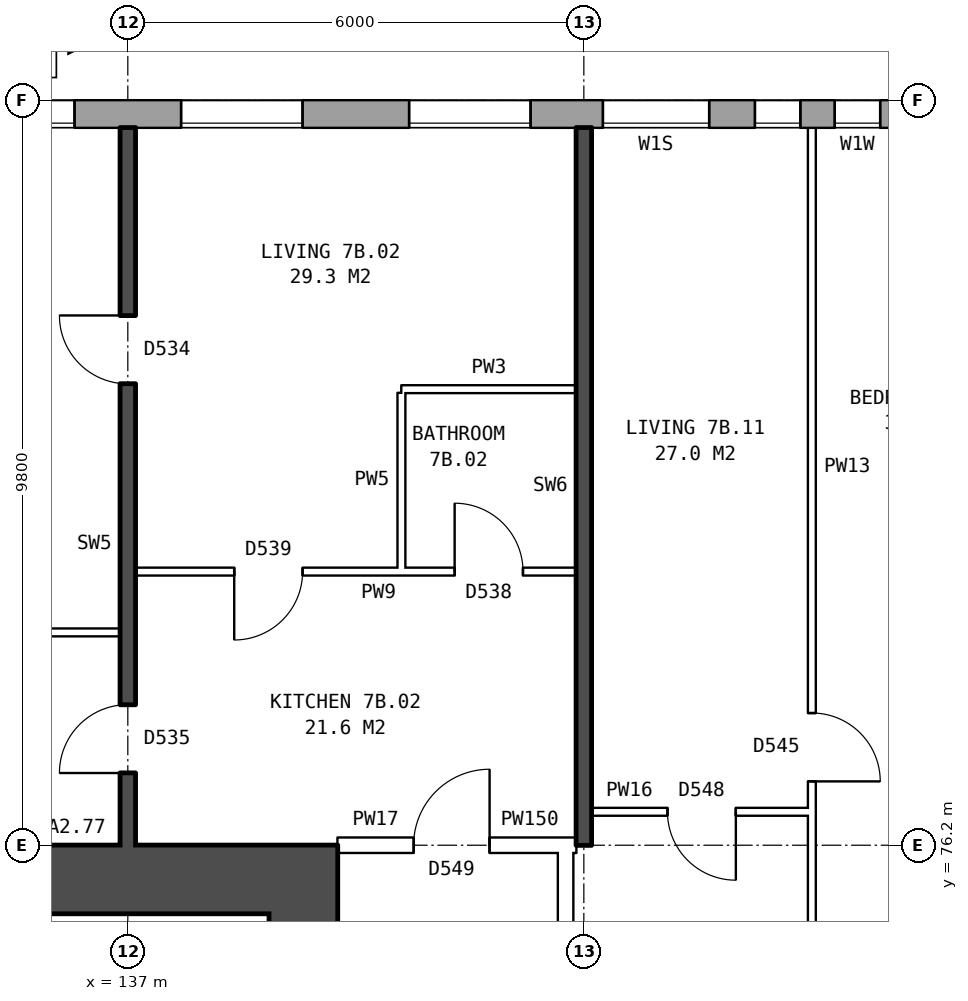
"""IFC4 building model, lengths in metres.
Left out: names, types, materials, properties, quantities, classifications, styles, units other than length and angle.
Written with IfcOpenShell. Run it as: python <this file> out.ifc"""

import sys

from ifc_helpers import new_model, si_unit, direction, frame, frame_2d, origin, place, context, subcontext, project, spatial, rectangle, extrude, element, fill, save


model = new_model("IFC4")
c1 = context("Model", 3, precision=1e-05, world=origin(), true_north=direction((0.0, 1.0)))
c2 = subcontext(c1, "Body", "Model", "MODEL_VIEW")
j1 = project(units=[si_unit("LENGTHUNIT", "METRE"), si_unit("PLANEANGLEUNIT", "RADIAN")], contexts=[c1])
p1 = place(None, origin())
s1 = spatial("IfcSite", under=j1, at=p1, CompositionType="ELEMENT")
p2 = place(p1, origin())
s2 = spatial("IfcBuilding", under=s1, at=p2, CompositionType="ELEMENT")
p3 = place(p2, frame((0.0, 0.0, 28.8)))
s3 = spatial("IfcBuildingStorey", under=s2, at=p3, CompositionType="ELEMENT", Elevation=28.8)
p4 = place(p3, frame((174.675, 85.82, 0.0), z_axis=(0.0, 0.0, 1.0), x_axis=(-1.0, 0.0, 0.0)))
e1 = element("IfcWall", 1, at=p4, inside=s3, PredefinedType="STANDARD", context=c2, shape_type="SweptSolid", body=[
    extrude(rectangle(XDim=40.601, YDim=0.36, at=frame_2d((20.3, 0.0))), origin(), (0.0, 0.0, 1.0), 2.85),
])
p5 = place(p4, frame((2.375, 0.0, 0.8)))
e2 = element("IfcOpeningElement", 2, at=p5, cuts=e1, PredefinedType="OPENING", context=c2, shape_type="SweptSolid", body=[
    extrude(rectangle(XDim=1.6, YDim=1.8, at=frame_2d((0.8, 0.9))), frame((0.0, 0.19, 0.0), z_axis=(0.0, -1.0, 0.0), x_axis=(1.0, 0.0, 0.0)), (0.0, 0.0, 1.0), 0.38),
])
p6 = place(p4, frame((5.375, 0.0, 0.8)))
e3 = element("IfcOpeningElement", 3, at=p6, cuts=e1, PredefinedType="OPENING", context=c2, shape_type="SweptSolid", body=[
    extrude(rectangle(XDim=1.6, YDim=1.8, at=frame_2d((0.8, 0.9))), frame((0.0, 0.19, 0.0), z_axis=(0.0, -1.0, 0.0), x_axis=(1.0, 0.0, 0.0)), (0.0, 0.0, 1.0), 0.38),
])
p7 = place(p4, frame((7.875, 0.0, 0.8)))
e4 = element("IfcOpeningElement", 4, at=p7, cuts=e1, PredefinedType="OPENING", context=c2, shape_type="SweptSolid", body=[
    extrude(rectangle(XDim=1.6, YDim=1.8, at=frame_2d((0.8, 0.9))), frame((0.0, 0.19, 0.0), z_axis=(0.0, -1.0, 0.0), x_axis=(1.0, 0.0, 0.0)), (0.0, 0.0, 1.0), 0.38),
])
p8 = place(p4, frame((9.775, 0.0, 1.7)))
e5 = element("IfcOpeningElement", 5, at=p8, cuts=e1, PredefinedType="OPENING", context=c2, shape_type="SweptSolid", body=[
    extrude(rectangle(XDim=0.8, YDim=0.9, at=frame_2d((0.4, 0.45))), frame((0.0, 0.19, 0.0), z_axis=(0.0, -1.0, 0.0), x_axis=(1.0, 0.0, 0.0)), (0.0, 0.0, 1.0), 0.38),
])
p9 = place(p4, frame((14.375, 0.0, 0.8)))
e6 = element("IfcOpeningElement", 6, at=p9, cuts=e1, PredefinedType="OPENING", context=c2, shape_type="SweptSolid", body=[
    extrude(rectangle(XDim=1.6, YDim=1.8, at=frame_2d((0.8, 0.9))), frame((0.0, 0.19, 0.0), z_axis=(0.0, -1.0, 0.0), x_axis=(1.0, 0.0, 0.0)), (0.0, 0.0, 1.0), 0.38),
])
p10 = place(p4, frame((17.375, 0.0, 0.8)))
e7 = element("IfcOpeningElement", 7, at=p10, cuts=e1, PredefinedType="OPENING", context=c2, shape_type="SweptSolid", body=[
    extrude(rectangle(XDim=1.6, YDim=1.8, at=frame_2d((0.8, 0.9))), frame((0.0, 0.19, 0.0), z_axis=(0.0, -1.0, 0.0), x_axis=(1.0, 0.0, 0.0)), (0.0, 0.0, 1.0), 0.38),
])
p11 = place(p4, frame((20.375, 0.0, 0.8)))
e8 = element("IfcOpeningElement", 8, at=p11, cuts=e1, PredefinedType="OPENING", context=c2, shape_type="SweptSolid", body=[
    extrude(rectangle(XDim=1.6, YDim=1.8, at=frame_2d((0.8, 0.9))), frame((0.0, 0.19, 0.0), z_axis=(0.0, -1.0, 0.0), x_axis=(1.0, 0.0, 0.0)), (0.0, 0.0, 1.0), 0.38),
])
p12 = place(p4, frame((23.375, 0.0, 0.8)))
e9 = element("IfcOpeningElement", 9, at=p12, cuts=e1, PredefinedType="OPENING", context=c2, shape_type="SweptSolid", body=[
    extrude(rectangle(XDim=1.6, YDim=1.8, at=frame_2d((0.8, 0.9))), frame((0.0, 0.19, 0.0), z_axis=(0.0, -1.0, 0.0), x_axis=(1.0, 0.0, 0.0)), (0.0, 0.0, 1.0), 0.38),
])
p13 = place(p4, frame((25.875, 0.0, 0.8)))
e10 = element("IfcOpeningElement", 10, at=p13, cuts=e1, PredefinedType="OPENING", context=c2, shape_type="SweptSolid", body=[
    extrude(rectangle(XDim=1.6, YDim=1.8, at=frame_2d((0.8, 0.9))), frame((0.0, 0.19, 0.0), z_axis=(0.0, -1.0, 0.0), x_axis=(1.0, 0.0, 0.0)), (0.0, 0.0, 1.0), 0.38),
])
p14 = place(p4, frame((28.825, 0.0, 0.15)))
e11 = element("IfcOpeningElement", 11, at=p14, cuts=e1, PredefinedType="OPENING", context=c2, shape_type="SweptSolid", body=[
    extrude(rectangle(XDim=0.6, YDim=0.9, at=frame_2d((0.3, 0.45))), frame((0.0, 0.19, 0.0), z_axis=(0.0, -1.0, 0.0), x_axis=(1.0, 0.0, 0.0)), (0.0, 0.0, 1.0), 0.38),
])
p15 = place(p4, frame((32.375, 0.0, 0.8)))
e12 = element("IfcOpeningElement", 12, at=p15, cuts=e1, PredefinedType="OPENING", context=c2, shape_type="SweptSolid", body=[
    extrude(rectangle(XDim=1.6, YDim=1.8, at=frame_2d((0.8, 0.9))), frame((0.0, 0.19, 0.0), z_axis=(0.0, -1.0, 0.0), x_axis=(1.0, 0.0, 0.0)), (0.0, 0.0, 1.0), 0.38),
])
p16 = place(p4, frame((35.375, 0.0, 0.8)))
e13 = element("IfcOpeningElement", 13, at=p16, cuts=e1, PredefinedType="OPENING", context=c2, shape_type="SweptSolid", body=[
    extrude(rectangle(XDim=1.6, YDim=1.8, at=frame_2d((0.8, 0.9))), frame((0.0, 0.19, 0.0), z_axis=(0.0, -1.0, 0.0), x_axis=(1.0, 0.0, 0.0)), (0.0, 0.0, 1.0), 0.38),
])
p17 = place(p4, frame((38.375, 0.0, 0.8)))
e14 = element("IfcOpeningElement", 14, at=p17, cuts=e1, PredefinedType="OPENING", context=c2, shape_type="SweptSolid", body=[
    extrude(rectangle(XDim=1.6, YDim=1.8, at=frame_2d((0.8, 0.9))), frame((0.0, 0.19, 0.0), z_axis=(0.0, -1.0, 0.0), x_axis=(1.0, 0.0, 0.0)), (0.0, 0.0, 1.0), 0.38),
])
p18 = place(p4, frame((12.275, 0.0, 0.8)))
e15 = element("IfcOpeningElement", 15, at=p18, cuts=e1, PredefinedType="OPENING", context=c2, shape_type="SweptSolid", body=[
    extrude(rectangle(XDim=1.2, YDim=1.2, at=frame_2d((0.6, 0.6))), frame((0.0, 0.19, 0.0), z_axis=(0.0, -1.0, 0.0), x_axis=(1.0, 0.0, 0.0)), (0.0, 0.0, 1.0), 0.38),
])
p19 = place(p4, frame((27.775, 0.0, 0.8)))
e16 = element("IfcOpeningElement", 16, at=p19, cuts=e1, PredefinedType="OPENING", context=c2, shape_type="SweptSolid", body=[
    extrude(rectangle(XDim=0.6, YDim=0.9, at=frame_2d((0.3, 0.45))), frame((0.0, 0.19, 0.0), z_axis=(0.0, -1.0, 0.0), x_axis=(1.0, 0.0, 0.0)), (0.0, 0.0, 1.0), 0.38),
])
p20 = place(p4, frame((30.025, 0.0, 1.65)))
e17 = element("IfcOpeningElement", 17, at=p20, cuts=e1, PredefinedType="OPENING", context=c2, shape_type="SweptSolid", body=[
    extrude(rectangle(XDim=1.4, YDim=0.9, at=frame_2d((0.7, 0.45))), frame((0.0, 0.19, 0.0), z_axis=(0.0, -1.0, 0.0), x_axis=(1.0, 0.0, 0.0)), (0.0, 0.0, 1.0), 0.38),
])
p21 = place(p3, frame((139.31, 64.7, 0.0), z_axis=(0.0, 0.0, 1.0), x_axis=(0.0, 1.0, 0.0)))
e18 = element("IfcWall", 18, at=p21, inside=s3, PredefinedType="SHEAR", context=c2, shape_type="SweptSolid", body=[
    extrude(rectangle(XDim=10.6, YDim=0.9, at=frame_2d((5.3, 0.0))), origin(), (0.0, 0.0, 1.0), 2.85),
])
p22 = place(p21, frame((0.425, 0.0, 0.0)))
e19 = element("IfcOpeningElement", 19, at=p22, cuts=e18, PredefinedType="OPENING", context=c2, shape_type="SweptSolid", body=[
    extrude(rectangle(XDim=1.1, YDim=2.1, at=frame_2d((0.55, 1.05))), frame((0.0, 0.46, 0.0), z_axis=(0.0, -1.0, 0.0), x_axis=(1.0, 0.0, 0.0)), (0.0, 0.0, 1.0), 0.92),
])
p23 = place(p21, frame((9.0, 0.0, 0.0)))
e20 = element("IfcOpeningElement", 20, at=p23, cuts=e18, PredefinedType="OPENING", context=c2, shape_type="SweptSolid", body=[
    extrude(rectangle(XDim=1.1, YDim=2.1, at=frame_2d((0.55, 1.05))), frame((0.0, 0.46, 0.0), z_axis=(0.0, -1.0, 0.0), x_axis=(1.0, 0.0, 0.0)), (0.0, 0.0, 1.0), 0.92),
])
p24 = place(p21, frame((7.225, 0.0, 0.0)))
e21 = element("IfcOpeningElement", 21, at=p24, cuts=e18, PredefinedType="OPENING", context=c2, shape_type="SweptSolid", body=[
    extrude(rectangle(XDim=0.85, YDim=2.1, at=frame_2d((0.425, 1.05))), frame((0.0, 0.46, 0.0), z_axis=(0.0, -1.0, 0.0), x_axis=(1.0, 0.0, 0.0)), (0.0, 0.0, 1.0), 0.92),
])
p25 = place(p3, frame((139.76, 75.75, 0.0), z_axis=(0.0, 0.0, 1.0), x_axis=(-1.0, 0.0, 0.0)))
e22 = element("IfcWall", 22, at=p25, inside=s3, PredefinedType="SHEAR", context=c2, shape_type="SweptSolid", body=[
    extrude(rectangle(XDim=8.4, YDim=0.9, at=frame_2d((4.2, 0.0))), origin(), (0.0, 0.0, 1.0), 2.85),
])
p26 = place(p3, frame((142.76, 63.9, 0.0), z_axis=(0.0, 0.0, 1.0), x_axis=(0.0, 1.0, 0.0)))
e23 = element("IfcWall", 23, at=p26, inside=s3, PredefinedType="PARTITIONING", context=c2, shape_type="SweptSolid", body=[
    extrude(rectangle(XDim=12.2, YDim=0.2, at=frame_2d((6.1, 0.0))), origin(), (0.0, 0.0, 1.0), 2.85),
])
p27 = place(p26, frame((5.1, 0.0, 0.0)))
e24 = element("IfcOpeningElement", 24, at=p27, cuts=e23, PredefinedType="OPENING", context=c2, shape_type="SweptSolid", body=[
    extrude(rectangle(XDim=2.0, YDim=2.1, at=frame_2d((1.0, 1.05))), frame((0.0, 0.11, 0.0), z_axis=(0.0, -1.0, 0.0), x_axis=(1.0, 0.0, 0.0)), (0.0, 0.0, 1.0), 0.22),
])
p28 = place(p3, frame((139.76, 76.2, 0.0), z_axis=(0.0, 0.0, 1.0), x_axis=(1.0, 0.0, 0.0)))
e25 = element("IfcWall", 25, at=p28, inside=s3, PredefinedType="PARTITIONING", context=c2, shape_type="SweptSolid", body=[
    extrude(rectangle(XDim=3.0, YDim=0.2, at=frame_2d((1.5, 0.0))), origin(), (0.0, 0.0, 1.0), 2.85),
])
p29 = place(p28, frame((1.0, 0.0, 0.0)))
e26 = element("IfcOpeningElement", 26, at=p29, cuts=e25, PredefinedType="OPENING", context=c2, shape_type="SweptSolid", body=[
    extrude(rectangle(XDim=1.0, YDim=2.1, at=frame_2d((0.5, 1.05))), frame((0.0, 0.11, 0.0), z_axis=(0.0, -1.0, 0.0), x_axis=(1.0, 0.0, 0.0)), (0.0, 0.0, 1.0), 0.22),
])
p30 = place(p3, frame((142.76, 76.2, 0.0), z_axis=(0.0, 0.0, 1.0), x_axis=(1.0, 0.0, 0.0)))
e27 = element("IfcWall", 27, at=p30, inside=s3, PredefinedType="PARTITIONING", context=c2, shape_type="SweptSolid", body=[
    extrude(rectangle(XDim=0.14, YDim=0.2, at=frame_2d((0.07, 0.0))), origin(), (0.0, 0.0, 1.0), 2.85),
])
p31 = place(p3, frame((143.1, 76.64, 0.0), z_axis=(0.0, 0.0, 1.0), x_axis=(1.0, 0.0, 0.0)))
e28 = element("IfcWall", 28, at=p31, inside=s3, PredefinedType="PARTITIONING", context=c2, shape_type="SweptSolid", body=[
    extrude(rectangle(XDim=2.9, YDim=0.1, at=frame_2d((1.45, 0.0))), origin(), (0.0, 0.0, 1.0), 2.85),
])
p32 = place(p31, frame((1.0, 0.0, 0.0)))
e29 = element("IfcOpeningElement", 29, at=p32, cuts=e28, PredefinedType="OPENING", context=c2, shape_type="SweptSolid", body=[
    extrude(rectangle(XDim=0.9, YDim=2.1, at=frame_2d((0.45, 1.05))), frame((0.0, 0.06, 0.0), z_axis=(0.0, -1.0, 0.0), x_axis=(1.0, 0.0, 0.0)), (0.0, 0.0, 1.0), 0.12),
])
p33 = place(p3, frame((131.36, 79.0, 0.0), z_axis=(0.0, 0.0, 1.0), x_axis=(1.0, 0.0, 0.0)))
e30 = element("IfcWall", 30, at=p33, inside=s3, PredefinedType="PARTITIONING", context=c2, shape_type="SweptSolid", body=[
    extrude(rectangle(XDim=5.54, YDim=0.1, at=frame_2d((2.77, 0.0))), origin(), (0.0, 0.0, 1.0), 2.85),
])
p34 = place(p3, frame((137.1, 79.8, 0.0), z_axis=(0.0, 0.0, 1.0), x_axis=(1.0, 0.0, 0.0)))
e31 = element("IfcWall", 31, at=p34, inside=s3, PredefinedType="PARTITIONING", context=c2, shape_type="SweptSolid", body=[
    extrude(rectangle(XDim=5.8, YDim=0.1, at=frame_2d((2.9, 0.0))), origin(), (0.0, 0.0, 1.0), 2.85),
])
p35 = place(p34, frame((1.3, 0.0, 0.0)))
e32 = element("IfcOpeningElement", 32, at=p35, cuts=e31, PredefinedType="OPENING", context=c2, shape_type="SweptSolid", body=[
    extrude(rectangle(XDim=0.9, YDim=2.1, at=frame_2d((0.45, 1.05))), frame((0.0, 0.06, 0.0), z_axis=(0.0, -1.0, 0.0), x_axis=(1.0, 0.0, 0.0)), (0.0, 0.0, 1.0), 0.12),
])
p36 = place(p34, frame((4.2, 0.0, 0.0)))
e33 = element("IfcOpeningElement", 33, at=p36, cuts=e31, PredefinedType="OPENING", context=c2, shape_type="SweptSolid", body=[
    extrude(rectangle(XDim=0.9, YDim=2.1, at=frame_2d((0.45, 1.05))), frame((0.0, 0.06, 0.0), z_axis=(0.0, -1.0, 0.0), x_axis=(1.0, 0.0, 0.0)), (0.0, 0.0, 1.0), 0.12),
])
p37 = place(p3, frame((140.6, 82.2, 0.0), z_axis=(0.0, 0.0, 1.0), x_axis=(1.0, 0.0, 0.0)))
e34 = element("IfcWall", 34, at=p37, inside=s3, PredefinedType="PARTITIONING", context=c2, shape_type="SweptSolid", body=[
    extrude(rectangle(XDim=2.3, YDim=0.1, at=frame_2d((1.15, 0.0))), origin(), (0.0, 0.0, 1.0), 2.85),
])
p38 = place(p3, frame((137.0, 76.2, 0.0), z_axis=(0.0, 0.0, 1.0), x_axis=(0.0, 1.0, 0.0)))
e35 = element("IfcWall", 35, at=p38, inside=s3, PredefinedType="SOLIDWALL", context=c2, shape_type="SweptSolid", body=[
    extrude(rectangle(XDim=9.44, YDim=0.2, at=frame_2d((4.72, 0.0))), origin(), (0.0, 0.0, 1.0), 2.85),
])
p39 = place(p38, frame((6.07, 0.0, 0.0)))
e36 = element("IfcOpeningElement", 36, at=p39, cuts=e35, PredefinedType="OPENING", context=c2, shape_type="SweptSolid", body=[
    extrude(rectangle(XDim=0.9, YDim=2.1, at=frame_2d((0.45, 1.05))), frame((0.0, 0.11, 0.0), z_axis=(0.0, -1.0, 0.0), x_axis=(1.0, 0.0, 0.0)), (0.0, 0.0, 1.0), 0.22),
])
p40 = place(p38, frame((0.95, 0.0, 0.0)))
e37 = element("IfcOpeningElement", 37, at=p40, cuts=e35, PredefinedType="OPENING", context=c2, shape_type="SweptSolid", body=[
    extrude(rectangle(XDim=0.9, YDim=2.1, at=frame_2d((0.45, 1.05))), frame((0.0, 0.11, 0.0), z_axis=(0.0, -1.0, 0.0), x_axis=(1.0, 0.0, 0.0)), (0.0, 0.0, 1.0), 0.22),
])
p41 = place(p3, frame((140.6, 79.85, 0.0), z_axis=(0.0, 0.0, 1.0), x_axis=(0.0, 1.0, 0.0)))
e38 = element("IfcWall", 38, at=p41, inside=s3, PredefinedType="PARTITIONING", context=c2, shape_type="SweptSolid", body=[
    extrude(rectangle(XDim=2.3, YDim=0.1, at=frame_2d((1.15, 0.0))), origin(), (0.0, 0.0, 1.0), 2.85),
])
p42 = place(p3, frame((143.0, 76.2, 0.0), z_axis=(0.0, 0.0, 1.0), x_axis=(0.0, 1.0, 0.0)))
e39 = element("IfcWall", 39, at=p42, inside=s3, PredefinedType="SOLIDWALL", context=c2, shape_type="SweptSolid", body=[
    extrude(rectangle(XDim=9.44, YDim=0.2, at=frame_2d((4.72, 0.0))), origin(), (0.0, 0.0, 1.0), 2.85),
])
p43 = place(p3, frame((146.0, 71.3, 0.0), z_axis=(0.0, 0.0, 1.0), x_axis=(0.0, 1.0, 0.0)))
e40 = element("IfcWall", 40, at=p43, inside=s3, PredefinedType="PARTITIONING", context=c2, shape_type="SweptSolid", body=[
    extrude(rectangle(XDim=14.34, YDim=0.1, at=frame_2d((7.17, 0.0))), origin(), (0.0, 0.0, 1.0), 2.85),
])
p44 = place(p43, frame((5.74, 0.0, 0.0)))
e41 = element("IfcOpeningElement", 41, at=p44, cuts=e40, PredefinedType="OPENING", context=c2, shape_type="SweptSolid", body=[
    extrude(rectangle(XDim=0.9, YDim=2.1, at=frame_2d((0.45, 1.05))), frame((0.0, 0.06, 0.0), z_axis=(0.0, -1.0, 0.0), x_axis=(1.0, 0.0, 0.0)), (0.0, 0.0, 1.0), 0.12),
])
p45 = place(p43, frame((0.4, 0.0, 0.0)))
e42 = element("IfcOpeningElement", 42, at=p45, cuts=e40, PredefinedType="OPENING", context=c2, shape_type="SweptSolid", body=[
    extrude(rectangle(XDim=0.9, YDim=2.1, at=frame_2d((0.45, 1.05))), frame((0.0, 0.06, 0.0), z_axis=(0.0, -1.0, 0.0), x_axis=(1.0, 0.0, 0.0)), (0.0, 0.0, 1.0), 0.12),
])
p46 = place(p14, origin())
e43 = element("IfcWindow", 43, at=p46, inside=s3, PartitioningType="SINGLE_PANEL", PredefinedType="WINDOW", context=c2, shape_type="SweptSolid", body=[
    extrude(rectangle(XDim=0.6, YDim=0.9, at=frame_2d((0.3, 0.45))), frame((0.0, 0.15, 0.0), z_axis=(0.0, -1.0, 0.0), x_axis=(1.0, 0.0, 0.0)), (0.0, 0.0, 1.0), 0.06),
])
fill(e11, e43)
p47 = place(p15, origin())
e44 = element("IfcWindow", 44, at=p47, inside=s3, PartitioningType="SINGLE_PANEL", PredefinedType="WINDOW", context=c2, shape_type="SweptSolid", body=[
    extrude(rectangle(XDim=1.6, YDim=1.8, at=frame_2d((0.8, 0.9))), frame((0.0, 0.15, 0.0), z_axis=(0.0, -1.0, 0.0), x_axis=(1.0, 0.0, 0.0)), (0.0, 0.0, 1.0), 0.06),
])
fill(e12, e44)
p48 = place(p16, origin())
e45 = element("IfcWindow", 45, at=p48, inside=s3, PartitioningType="SINGLE_PANEL", PredefinedType="WINDOW", context=c2, shape_type="SweptSolid", body=[
    extrude(rectangle(XDim=1.6, YDim=1.8, at=frame_2d((0.8, 0.9))), frame((0.0, 0.15, 0.0), z_axis=(0.0, -1.0, 0.0), x_axis=(1.0, 0.0, 0.0)), (0.0, 0.0, 1.0), 0.06),
])
fill(e13, e45)
p49 = place(p17, origin())
e46 = element("IfcWindow", 46, at=p49, inside=s3, PartitioningType="SINGLE_PANEL", PredefinedType="WINDOW", context=c2, shape_type="SweptSolid", body=[
    extrude(rectangle(XDim=1.6, YDim=1.8, at=frame_2d((0.8, 0.9))), frame((0.0, 0.15, 0.0), z_axis=(0.0, -1.0, 0.0), x_axis=(1.0, 0.0, 0.0)), (0.0, 0.0, 1.0), 0.06),
])
fill(e14, e46)
p50 = place(p39, origin())
e47 = element("IfcDoor", 47, at=p50, inside=s3, OperationType="SINGLE_SWING_RIGHT", PredefinedType="DOOR", context=c2, shape_type="SweptSolid", body=[
    extrude(rectangle(XDim=0.9, YDim=2.1, at=frame_2d((0.45, 1.05))), frame((0.0, 0.025, 0.0), z_axis=(0.0, -1.0, 0.0), x_axis=(1.0, 0.0, 0.0)), (0.0, 0.0, 1.0), 0.05),
])
fill(e36, e47)
p51 = place(p40, origin())
e48 = element("IfcDoor", 48, at=p51, inside=s3, OperationType="SINGLE_SWING_LEFT", PredefinedType="DOOR", context=c2, shape_type="SweptSolid", body=[
    extrude(rectangle(XDim=0.9, YDim=2.1, at=frame_2d((0.45, 1.05))), frame((0.0, 0.025, 0.0), z_axis=(0.0, -1.0, 0.0), x_axis=(1.0, 0.0, 0.0)), (0.0, 0.0, 1.0), 0.05),
])
fill(e37, e48)
p52 = place(p29, origin())
e49 = element("IfcDoor", 49, at=p52, inside=s3, OperationType="SINGLE_SWING_RIGHT", PredefinedType="DOOR", context=c2, shape_type="SweptSolid", body=[
    extrude(rectangle(XDim=1.0, YDim=2.1, at=frame_2d((0.5, 1.05))), frame((0.0, 0.025, 0.0), z_axis=(0.0, -1.0, 0.0), x_axis=(1.0, 0.0, 0.0)), (0.0, 0.0, 1.0), 0.05),
])
fill(e26, e49)
p53 = place(p35, frame((0.9, 0.0, 0.0), z_axis=(0.0, 0.0, 1.0), x_axis=(-1.0, 0.0, 0.0)))
e50 = element("IfcDoor", 50, at=p53, inside=s3, OperationType="SINGLE_SWING_RIGHT", PredefinedType="DOOR", context=c2, shape_type="SweptSolid", body=[
    extrude(rectangle(XDim=0.9, YDim=2.1, at=frame_2d((0.45, 1.05))), frame((0.0, 0.025, 0.0), z_axis=(0.0, -1.0, 0.0), x_axis=(1.0, 0.0, 0.0)), (0.0, 0.0, 1.0), 0.05),
])
fill(e32, e50)
p54 = place(p36, origin())
e51 = element("IfcDoor", 51, at=p54, inside=s3, OperationType="SINGLE_SWING_LEFT", PredefinedType="DOOR", context=c2, shape_type="SweptSolid", body=[
    extrude(rectangle(XDim=0.9, YDim=2.1, at=frame_2d((0.45, 1.05))), frame((0.0, 0.025, 0.0), z_axis=(0.0, -1.0, 0.0), x_axis=(1.0, 0.0, 0.0)), (0.0, 0.0, 1.0), 0.05),
])
fill(e33, e51)
p55 = place(p44, frame((0.9, 0.0, 0.0), z_axis=(0.0, 0.0, 1.0), x_axis=(-1.0, 0.0, 0.0)))
e52 = element("IfcDoor", 52, at=p55, inside=s3, OperationType="SINGLE_SWING_RIGHT", PredefinedType="DOOR", context=c2, shape_type="SweptSolid", body=[
    extrude(rectangle(XDim=0.9, YDim=2.1, at=frame_2d((0.45, 1.05))), frame((0.0, 0.025, 0.0), z_axis=(0.0, -1.0, 0.0), x_axis=(1.0, 0.0, 0.0)), (0.0, 0.0, 1.0), 0.05),
])
fill(e41, e52)
p56 = place(p32, frame((0.9, 0.0, 0.0), z_axis=(0.0, 0.0, 1.0), x_axis=(-1.0, 0.0, 0.0)))
e53 = element("IfcDoor", 53, at=p56, inside=s3, OperationType="SINGLE_SWING_LEFT", PredefinedType="DOOR", context=c2, shape_type="SweptSolid", body=[
    extrude(rectangle(XDim=0.9, YDim=2.1, at=frame_2d((0.45, 1.05))), frame((0.0, 0.025, 0.0), z_axis=(0.0, -1.0, 0.0), x_axis=(1.0, 0.0, 0.0)), (0.0, 0.0, 1.0), 0.05),
])
fill(e29, e53)
p57 = place(p19, origin())
e54 = element("IfcWindow", 54, at=p57, inside=s3, PartitioningType="SINGLE_PANEL", PredefinedType="WINDOW", context=c2, shape_type="SweptSolid", body=[
    extrude(rectangle(XDim=0.6, YDim=0.9, at=frame_2d((0.3, 0.45))), frame((0.0, 0.15, 0.0), z_axis=(0.0, -1.0, 0.0), x_axis=(1.0, 0.0, 0.0)), (0.0, 0.0, 1.0), 0.06),
])
fill(e16, e54)
p58 = place(p20, origin())
e55 = element("IfcWindow", 55, at=p58, inside=s3, PartitioningType="SINGLE_PANEL", PredefinedType="WINDOW", context=c2, shape_type="SweptSolid", body=[
    extrude(rectangle(XDim=1.4, YDim=0.9, at=frame_2d((0.7, 0.45))), frame((0.0, 0.15, 0.0), z_axis=(0.0, -1.0, 0.0), x_axis=(1.0, 0.0, 0.0)), (0.0, 0.0, 1.0), 0.06),
])
fill(e17, e55)
save(model, sys.argv[1])
